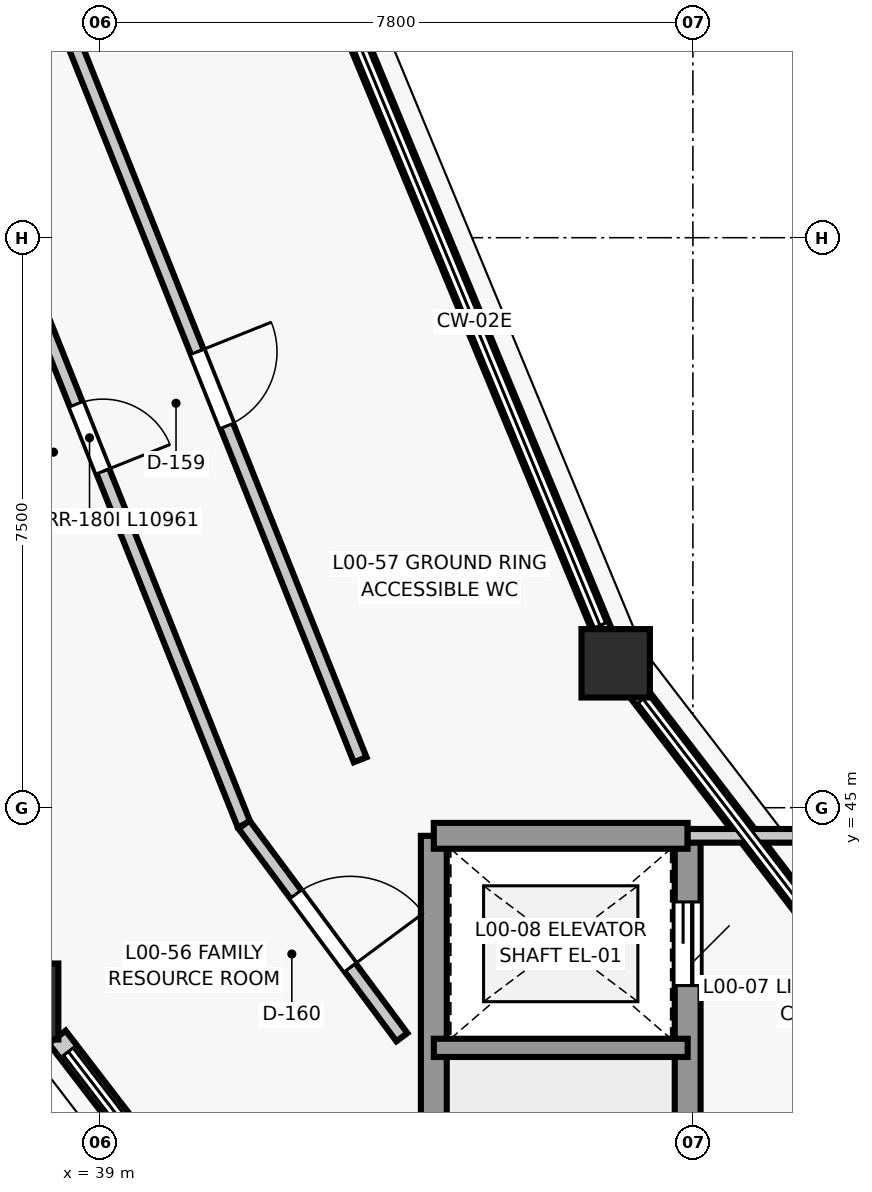
"""IFC4 building model, lengths in metres.
Left out: names, types, materials, properties, quantities, classifications, styles, units other than length and angle.
Written with IfcOpenShell. Run it as: python <this file> out.ifc"""

import sys

from ifc_helpers import new_model, si_unit, direction, frame, frame_2d, origin, origin_2d, place, context, subcontext, project, spatial, rectangle, circle, extrude, element, fill, save


model = new_model("IFC4")
c1 = context("Model", 3, precision=1e-05, world=origin(), true_north=direction((0.0, 1.0)))
c2 = subcontext(c1, "Body", "Model", "MODEL_VIEW")
j1 = project(units=[si_unit("LENGTHUNIT", "METRE"), si_unit("PLANEANGLEUNIT", "RADIAN")], contexts=[c1])
p1 = place(None, origin())
s1 = spatial("IfcSite", under=j1, at=p1, CompositionType="ELEMENT")
p2 = place(p1, origin())
s2 = spatial("IfcBuilding", under=s1, at=p2, CompositionType="ELEMENT")
p3 = place(p2, origin())
s3 = spatial("IfcBuildingStorey", under=s2, at=p3, CompositionType="ELEMENT", Elevation=0.0)
p4 = place(p3, frame((45.784, 46.9, 0.0), z_axis=(0.0, 0.0, 1.0), x_axis=(1.0, 0.0, 0.0)))
e1 = element("IfcColumn", 1, at=p4, inside=s3, PredefinedType="COLUMN", context=c2, shape_type="SweptSolid", body=[
    extrude(circle(Radius=0.45, at=origin_2d()), origin(), (0.0, 0.0, 1.0), 4.5),
])
p5 = place(p3, frame((38.076, 42.45, 0.0), z_axis=(0.0, 0.0, 1.0), x_axis=(1.0, 0.0, 0.0)))
e2 = element("IfcColumn", 2, at=p5, inside=s3, PredefinedType="COLUMN", context=c2, shape_type="SweptSolid", body=[
    extrude(rectangle(XDim=0.75, YDim=1.0, at=origin_2d()), origin(), (0.0, 0.0, 1.0), 4.5),
])
p6 = place(p3, frame((42.182, 55.595, 0.0), z_axis=(0.0, 0.0, 1.0), x_axis=(0.382681519675, -0.923880324771, 0.0)))
e3 = element("IfcWall", 3, at=p6, inside=s3, PredefinedType="STANDARD", context=c2, shape_type="SweptSolid", body=[
    extrude(rectangle(XDim=9.112, YDim=0.25, at=frame_2d((4.556, 0.0))), origin(), (0.0, 0.0, 1.0), 0.82),
])
p7 = place(p3, frame((45.042, 33.371, 0.0), z_axis=(0.0, 0.0, 1.0), x_axis=(-0.608753590889, 0.79335935463, 0.0)))
e4 = element("IfcWall", 4, at=p7, inside=s3, PredefinedType="STANDARD", context=c2, shape_type="SweptSolid", body=[
    extrude(rectangle(XDim=10.852, YDim=0.28, at=frame_2d((5.426, 0.0))), origin(), (0.0, 0.0, 1.0), 0.82),
])
p8 = place(p3, frame((45.999, 46.62, 0.0), z_axis=(0.0, 0.0, 1.0), x_axis=(0.608769580289, -0.793347085527, 0.0)))
e5 = element("IfcWall", 5, at=p8, inside=s3, PredefinedType="STANDARD", context=c2, shape_type="SweptSolid", body=[
    extrude(rectangle(XDim=9.005, YDim=0.25, at=frame_2d((4.502, 0.0))), origin(), (0.0, 0.0, 1.0), 0.82),
])
p9 = place(p3, frame((46.731, 44.63, 0.0), z_axis=(0.0, 0.0, 1.0), x_axis=(0.0, -1.0, 0.0)))
e6 = element("IfcWall", 6, at=p9, inside=s3, PredefinedType="SHEAR", context=c2, shape_type="SweptSolid", body=[
    extrude(rectangle(XDim=9.73, YDim=0.34, at=frame_2d((4.865, 0.0))), origin(), (0.0, 0.0, 1.0), 4.5),
])
p10 = place(p9, frame((8.19, 0.0, 0.0)))
e7 = element("IfcOpeningElement", 7, at=p10, cuts=e6, PredefinedType="OPENING", context=c2, shape_type="SweptSolid", body=[
    extrude(rectangle(XDim=1.3, YDim=2.15, at=frame_2d((0.65, 1.075))), frame((0.0, 0.18, 0.0), z_axis=(0.0, -1.0, 0.0), x_axis=(1.0, 0.0, 0.0)), (0.0, 0.0, 1.0), 0.36),
])
p11 = place(p9, frame((0.87, 0.0, 0.0)))
e8 = element("IfcOpeningElement", 8, at=p11, cuts=e6, PredefinedType="OPENING", context=c2, shape_type="SweptSolid", body=[
    extrude(rectangle(XDim=1.1, YDim=2.15, at=frame_2d((0.55, 1.075))), frame((0.0, 0.18, 0.0), z_axis=(0.0, -1.0, 0.0), x_axis=(1.0, 0.0, 0.0)), (0.0, 0.0, 1.0), 0.36),
])
p12 = place(p3, frame((43.391, 34.9, 0.0), z_axis=(0.0, 0.0, 1.0), x_axis=(0.0, 1.0, 0.0)))
e9 = element("IfcWall", 9, at=p12, inside=s3, PredefinedType="SHEAR", context=c2, shape_type="SweptSolid", body=[
    extrude(rectangle(XDim=9.73, YDim=0.34, at=frame_2d((4.865, 0.0))), origin(), (0.0, 0.0, 1.0), 4.5),
])
p13 = place(p3, frame((43.391, 44.63, 0.0), z_axis=(0.0, 0.0, 1.0), x_axis=(1.0, 0.0, 0.0)))
e10 = element("IfcWall", 10, at=p13, inside=s3, PredefinedType="SHEAR", context=c2, shape_type="SweptSolid", body=[
    extrude(rectangle(XDim=3.34, YDim=0.34, at=frame_2d((1.67, 0.0))), origin(), (0.0, 0.0, 1.0), 4.5),
])
p14 = place(p3, frame((46.731, 41.84, 0.0), z_axis=(0.0, 0.0, 1.0), x_axis=(-1.0, 0.0, 0.0)))
e11 = element("IfcWall", 11, at=p14, inside=s3, PredefinedType="SHEAR", context=c2, shape_type="SweptSolid", body=[
    extrude(rectangle(XDim=3.34, YDim=0.24, at=frame_2d((1.67, 0.0))), origin(), (0.0, 0.0, 1.0), 4.5),
])
p15 = place(p3, frame((46.731, 44.63, 0.0), z_axis=(0.0, 0.0, 1.0), x_axis=(1.0, 0.0, 0.0)))
e12 = element("IfcWall", 12, at=p15, inside=s3, PredefinedType="PARTITIONING", context=c2, shape_type="SweptSolid", body=[
    extrude(rectangle(XDim=2.25, YDim=0.18, at=frame_2d((1.125, 0.0))), origin(), (0.0, 0.0, 1.0), 4.255),
])
p16 = place(p3, frame((36.829, 54.957, 0.0), z_axis=(0.0, 0.0, 1.0), x_axis=(0.370918279433, -0.928665510279, 0.0)))
e13 = element("IfcWall", 13, at=p16, inside=s3, PredefinedType="PARTITIONING", context=c2, shape_type="SweptSolid", body=[
    extrude(rectangle(XDim=10.961, YDim=0.18, at=frame_2d((5.48, 0.0))), origin(), (0.0, 0.0, 1.0), 4.255),
])
p17 = place(p16, frame((5.006, 0.0, 0.0)))
e14 = element("IfcOpeningElement", 14, at=p17, cuts=e13, PredefinedType="OPENING", context=c2, shape_type="SweptSolid", body=[
    extrude(rectangle(XDim=0.95, YDim=2.1, at=frame_2d((0.475, 1.05))), frame((0.0, 0.1, 0.0), z_axis=(0.0, -1.0, 0.0), x_axis=(1.0, 0.0, 0.0)), (0.0, 0.0, 1.0), 0.2),
])
p18 = place(p3, frame((38.524, 55.391, 0.0), z_axis=(0.0, 0.0, 1.0), x_axis=(0.370942047159, -0.92865601686, 0.0)))
e15 = element("IfcWall", 15, at=p18, inside=s3, PredefinedType="PARTITIONING", context=c2, shape_type="SweptSolid", body=[
    extrude(rectangle(XDim=10.51, YDim=0.18, at=frame_2d((5.255, 0.0))), origin(), (0.0, 0.0, 1.0), 4.255),
])
p19 = place(p18, frame((4.73, 0.0, 0.0)))
e16 = element("IfcOpeningElement", 16, at=p19, cuts=e15, PredefinedType="OPENING", context=c2, shape_type="SweptSolid", body=[
    extrude(rectangle(XDim=1.05, YDim=2.1, at=frame_2d((0.525, 1.05))), frame((0.0, 0.1, 0.0), z_axis=(0.0, -1.0, 0.0), x_axis=(1.0, 0.0, 0.0)), (0.0, 0.0, 1.0), 0.2),
])
p20 = place(p3, frame((40.894, 44.778, 0.0), z_axis=(0.0, 0.0, 1.0), x_axis=(0.59610205182, -0.802908677134, 0.0)))
e17 = element("IfcWall", 17, at=p20, inside=s3, PredefinedType="PARTITIONING", context=c2, shape_type="SweptSolid", body=[
    extrude(rectangle(XDim=3.484, YDim=0.18, at=frame_2d((1.742, 0.0))), origin(), (0.0, 0.0, 1.0), 4.255),
])
p21 = place(p20, frame((1.142, 0.0, 0.0)))
e18 = element("IfcOpeningElement", 18, at=p21, cuts=e17, PredefinedType="OPENING", context=c2, shape_type="SweptSolid", body=[
    extrude(rectangle(XDim=1.2, YDim=2.15, at=frame_2d((0.6, 1.075))), frame((0.0, 0.1, 0.0), z_axis=(0.0, -1.0, 0.0), x_axis=(1.0, 0.0, 0.0)), (0.0, 0.0, 1.0), 0.2),
])
p22 = place(p11, origin())
e19 = element("IfcDoor", 19, at=p22, inside=s3, OperationType="SLIDING_TO_LEFT", PredefinedType="DOOR", context=c2, shape_type="SweptSolid", body=[
    extrude(rectangle(XDim=1.1, YDim=2.15, at=frame_2d((0.55, 1.075))), frame((0.0, 0.025, 0.0), z_axis=(0.0, -1.0, 0.0), x_axis=(1.0, 0.0, 0.0)), (0.0, 0.0, 1.0), 0.05),
])
fill(e8, e19)
p23 = place(p17, origin())
e20 = element("IfcDoor", 20, at=p23, inside=s3, OperationType="SINGLE_SWING_RIGHT", PredefinedType="DOOR", context=c2, shape_type="SweptSolid", body=[
    extrude(rectangle(XDim=0.95, YDim=2.1, at=frame_2d((0.475, 1.05))), frame((0.0, 0.025, 0.0), z_axis=(0.0, -1.0, 0.0), x_axis=(1.0, 0.0, 0.0)), (0.0, 0.0, 1.0), 0.05),
])
fill(e14, e20)
p24 = place(p19, origin())
e21 = element("IfcDoor", 21, at=p24, inside=s3, OperationType="SINGLE_SWING_LEFT", PredefinedType="DOOR", context=c2, shape_type="SweptSolid", body=[
    extrude(rectangle(XDim=1.05, YDim=2.1, at=frame_2d((0.525, 1.05))), frame((0.0, 0.025, 0.0), z_axis=(0.0, -1.0, 0.0), x_axis=(1.0, 0.0, 0.0)), (0.0, 0.0, 1.0), 0.05),
])
fill(e16, e21)
p25 = place(p21, origin())
e22 = element("IfcDoor", 22, at=p25, inside=s3, OperationType="SINGLE_SWING_RIGHT", PredefinedType="DOOR", context=c2, shape_type="SweptSolid", body=[
    extrude(rectangle(XDim=1.2, YDim=2.15, at=frame_2d((0.6, 1.075))), frame((0.0, 0.025, 0.0), z_axis=(0.0, -1.0, 0.0), x_axis=(1.0, 0.0, 0.0)), (0.0, 0.0, 1.0), 0.05),
])
fill(e18, e22)
save(model, sys.argv[1])
